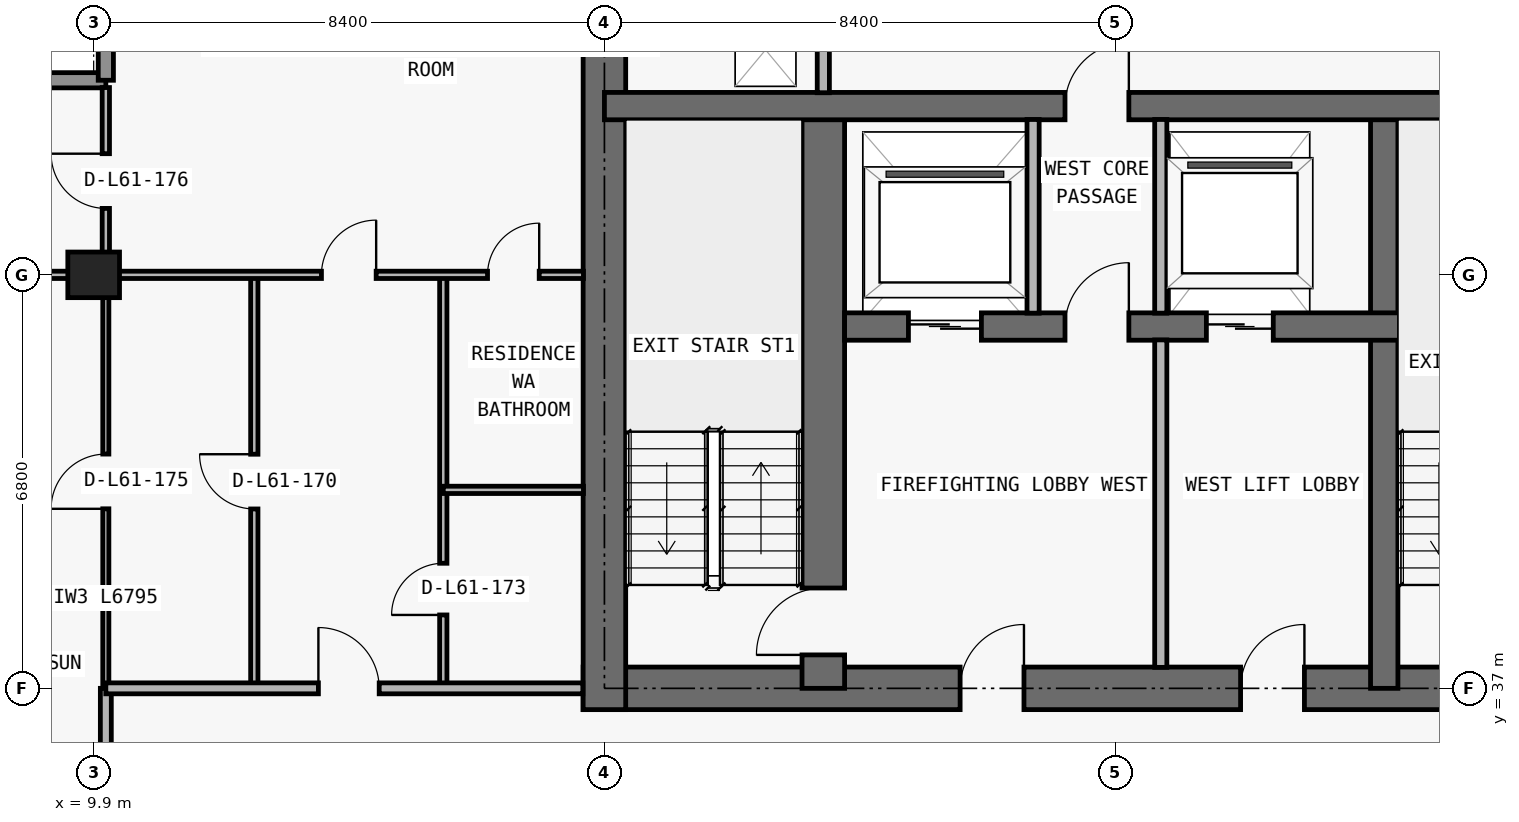
"""IFC4 building model, lengths in metres.
Left out: names, types, materials, properties, quantities, classifications, styles, units other than length and angle.
Written with IfcOpenShell. Run it as: python <this file> out.ifc"""

import sys

from ifc_helpers import new_model, si_unit, direction, frame, frame_2d, origin, origin_2d, place, context, subcontext, project, spatial, rectangle, extrude, element, fill, save


model = new_model("IFC4")
c1 = context("Model", 3, precision=1e-05, world=origin(), true_north=direction((0.0, 1.0)))
c2 = subcontext(c1, "Body", "Model", "MODEL_VIEW")
j1 = project(units=[si_unit("LENGTHUNIT", "METRE"), si_unit("PLANEANGLEUNIT", "RADIAN")], contexts=[c1])
p1 = place(None, origin())
s1 = spatial("IfcSite", under=j1, at=p1, CompositionType="ELEMENT")
p2 = place(p1, origin())
s2 = spatial("IfcBuilding", under=s1, at=p2, CompositionType="ELEMENT")
p3 = place(p2, frame((0.0, 0.0, 218.1)))
s3 = spatial("IfcBuildingStorey", under=s2, at=p3, CompositionType="ELEMENT", Elevation=218.1)
p4 = place(p3, frame((9.9, 43.8, 0.0), z_axis=(0.0, 0.0, 1.0), x_axis=(1.0, 0.0, 0.0)))
e1 = element("IfcColumn", 1, at=p4, inside=s3, PredefinedType="COLUMN", context=c2, shape_type="SweptSolid", body=[
    extrude(rectangle(XDim=0.85, YDim=0.75, at=origin_2d()), origin(), (0.0, 0.0, 1.0), 3.0),
])
p5 = place(p3, frame((17.95, 37.0, 0.0), z_axis=(0.0, 0.0, 1.0), x_axis=(1.0, 0.0, 0.0)))
e2 = element("IfcWall", 2, at=p5, inside=s3, PredefinedType="SHEAR", context=c2, shape_type="SweptSolid", body=[
    extrude(rectangle(XDim=41.9, YDim=0.7, at=frame_2d((20.95, 0.0))), origin(), (0.0, 0.0, 1.0), 3.0),
])
p6 = place(p5, frame((14.35, 0.0, 0.0)))
e3 = element("IfcOpeningElement", 3, at=p6, cuts=e2, PredefinedType="OPENING", context=c2, shape_type="SweptSolid", body=[
    extrude(rectangle(XDim=1.1, YDim=2.15, at=frame_2d((0.55, 1.075))), frame((0.0, 0.36, 0.0), z_axis=(0.0, -1.0, 0.0), x_axis=(1.0, 0.0, 0.0)), (0.0, 0.0, 1.0), 0.72),
])
p7 = place(p5, frame((6.2, 0.0, 0.0)))
e4 = element("IfcOpeningElement", 4, at=p7, cuts=e2, PredefinedType="OPENING", context=c2, shape_type="SweptSolid", body=[
    extrude(rectangle(XDim=1.05, YDim=2.15, at=frame_2d((0.525, 1.075))), frame((0.0, 0.36, 0.0), z_axis=(0.0, -1.0, 0.0), x_axis=(1.0, 0.0, 0.0)), (0.0, 0.0, 1.0), 0.72),
])
p8 = place(p5, frame((34.7, 0.0, 0.0)))
e5 = element("IfcOpeningElement", 5, at=p8, cuts=e2, PredefinedType="OPENING", context=c2, shape_type="SweptSolid", body=[
    extrude(rectangle(XDim=1.05, YDim=2.15, at=frame_2d((0.525, 1.075))), frame((0.0, 0.36, 0.0), z_axis=(0.0, -1.0, 0.0), x_axis=(1.0, 0.0, 0.0)), (0.0, 0.0, 1.0), 0.72),
])
p9 = place(p5, frame((10.812, 0.0, 0.0)))
e6 = element("IfcOpeningElement", 6, at=p9, cuts=e2, PredefinedType="OPENING", context=c2, shape_type="SweptSolid", body=[
    extrude(rectangle(XDim=1.05, YDim=2.15, at=frame_2d((0.525, 1.075))), frame((0.0, 0.36, 0.0), z_axis=(0.0, -1.0, 0.0), x_axis=(1.0, 0.0, 0.0)), (0.0, 0.0, 1.0), 0.72),
])
p10 = place(p5, frame((24.05, 0.0, 0.0)))
e7 = element("IfcOpeningElement", 7, at=p10, cuts=e2, PredefinedType="OPENING", context=c2, shape_type="SweptSolid", body=[
    extrude(rectangle(XDim=1.05, YDim=2.15, at=frame_2d((0.525, 1.075))), frame((0.0, 0.36, 0.0), z_axis=(0.0, -1.0, 0.0), x_axis=(1.0, 0.0, 0.0)), (0.0, 0.0, 1.0), 0.72),
])
p11 = place(p3, frame((18.3, 36.65, 0.0), z_axis=(0.0, 0.0, 1.0), x_axis=(0.0, 1.0, 0.0)))
e8 = element("IfcWall", 8, at=p11, inside=s3, PredefinedType="SHEAR", context=c2, shape_type="SweptSolid", body=[
    extrude(rectangle(XDim=13.95, YDim=0.7, at=frame_2d((6.975, 0.0))), origin(), (0.0, 0.0, 1.0), 3.0),
])
p12 = place(p3, frame((21.9, 37.0, 0.0), z_axis=(0.0, 0.0, 1.0), x_axis=(0.0, 1.0, 0.0)))
e9 = element("IfcWall", 9, at=p12, inside=s3, PredefinedType="SHEAR", context=c2, shape_type="SweptSolid", body=[
    extrude(rectangle(XDim=9.575, YDim=0.7, at=frame_2d((4.788, 0.0))), origin(), (0.0, 0.0, 1.0), 3.0),
])
p13 = place(p12, frame((0.55, 0.0, 0.0)))
e10 = element("IfcOpeningElement", 10, at=p13, cuts=e9, PredefinedType="OPENING", context=c2, shape_type="SweptSolid", body=[
    extrude(rectangle(XDim=1.1, YDim=2.15, at=frame_2d((0.55, 1.075))), frame((0.0, 0.36, 0.0), z_axis=(0.0, -1.0, 0.0), x_axis=(1.0, 0.0, 0.0)), (0.0, 0.0, 1.0), 0.72),
])
p14 = place(p3, frame((31.125, 37.0, 0.0), z_axis=(0.0, 0.0, 1.0), x_axis=(0.0, 1.0, 0.0)))
e11 = element("IfcWall", 11, at=p14, inside=s3, PredefinedType="SHEAR", context=c2, shape_type="SweptSolid", body=[
    extrude(rectangle(XDim=9.575, YDim=0.45, at=frame_2d((4.788, 0.0))), origin(), (0.0, 0.0, 1.0), 3.0),
])
p15 = place(p3, frame((22.25, 42.95, 0.0), z_axis=(0.0, 0.0, 1.0), x_axis=(1.0, 0.0, 0.0)))
e12 = element("IfcWall", 12, at=p15, inside=s3, PredefinedType="SHEAR", context=c2, shape_type="SweptSolid", body=[
    extrude(rectangle(XDim=33.3, YDim=0.45, at=frame_2d((16.65, 0.0))), origin(), (0.0, 0.0, 1.0), 3.0),
])
p16 = place(p15, frame((1.05, 0.0, 0.0)))
e13 = element("IfcOpeningElement", 13, at=p16, cuts=e12, PredefinedType="OPENING", context=c2, shape_type="SweptSolid", body=[
    extrude(rectangle(XDim=1.2, YDim=2.2, at=frame_2d((0.6, 1.1))), frame((0.0, 0.235, 0.0), z_axis=(0.0, -1.0, 0.0), x_axis=(1.0, 0.0, 0.0)), (0.0, 0.0, 1.0), 0.47),
])
p17 = place(p15, frame((31.05, 0.0, 0.0)))
e14 = element("IfcOpeningElement", 14, at=p17, cuts=e12, PredefinedType="OPENING", context=c2, shape_type="SweptSolid", body=[
    extrude(rectangle(XDim=1.2, YDim=2.2, at=frame_2d((0.6, 1.1))), frame((0.0, 0.235, 0.0), z_axis=(0.0, -1.0, 0.0), x_axis=(1.0, 0.0, 0.0)), (0.0, 0.0, 1.0), 0.47),
])
p18 = place(p15, frame((26.45, 0.0, 0.0)))
e15 = element("IfcOpeningElement", 15, at=p18, cuts=e12, PredefinedType="OPENING", context=c2, shape_type="SweptSolid", body=[
    extrude(rectangle(XDim=1.1, YDim=2.2, at=frame_2d((0.55, 1.1))), frame((0.0, 0.235, 0.0), z_axis=(0.0, -1.0, 0.0), x_axis=(1.0, 0.0, 0.0)), (0.0, 0.0, 1.0), 0.47),
])
p19 = place(p15, frame((5.95, 0.0, 0.0)))
e16 = element("IfcOpeningElement", 16, at=p19, cuts=e12, PredefinedType="OPENING", context=c2, shape_type="SweptSolid", body=[
    extrude(rectangle(XDim=1.1, YDim=2.2, at=frame_2d((0.55, 1.1))), frame((0.0, 0.235, 0.0), z_axis=(0.0, -1.0, 0.0), x_axis=(1.0, 0.0, 0.0)), (0.0, 0.0, 1.0), 0.47),
])
p20 = place(p15, frame((3.625, 0.0, 0.0)))
e17 = element("IfcOpeningElement", 17, at=p20, cuts=e12, PredefinedType="OPENING", context=c2, shape_type="SweptSolid", body=[
    extrude(rectangle(XDim=1.05, YDim=2.15, at=frame_2d((0.525, 1.075))), frame((0.0, 0.235, 0.0), z_axis=(0.0, -1.0, 0.0), x_axis=(1.0, 0.0, 0.0)), (0.0, 0.0, 1.0), 0.47),
])
p21 = place(p15, frame((28.675, 0.0, 0.0)))
e18 = element("IfcOpeningElement", 18, at=p21, cuts=e12, PredefinedType="OPENING", context=c2, shape_type="SweptSolid", body=[
    extrude(rectangle(XDim=1.05, YDim=2.15, at=frame_2d((0.525, 1.075))), frame((0.0, 0.235, 0.0), z_axis=(0.0, -1.0, 0.0), x_axis=(1.0, 0.0, 0.0)), (0.0, 0.0, 1.0), 0.47),
])
p22 = place(p15, frame((15.225, 0.0, 0.0)))
e19 = element("IfcOpeningElement", 19, at=p22, cuts=e12, PredefinedType="OPENING", context=c2, shape_type="SweptSolid", body=[
    extrude(rectangle(XDim=1.0, YDim=2.2, at=frame_2d((0.5, 1.1))), frame((0.0, 0.235, 0.0), z_axis=(0.0, -1.0, 0.0), x_axis=(1.0, 0.0, 0.0)), (0.0, 0.0, 1.0), 0.47),
])
p23 = place(p15, frame((21.975, 0.0, 0.0)))
e20 = element("IfcOpeningElement", 20, at=p23, cuts=e12, PredefinedType="OPENING", context=c2, shape_type="SweptSolid", body=[
    extrude(rectangle(XDim=1.0, YDim=2.2, at=frame_2d((0.5, 1.1))), frame((0.0, 0.235, 0.0), z_axis=(0.0, -1.0, 0.0), x_axis=(1.0, 0.0, 0.0)), (0.0, 0.0, 1.0), 0.47),
])
p24 = place(p3, frame((18.3, 46.575, 0.0), z_axis=(0.0, 0.0, 1.0), x_axis=(1.0, 0.0, 0.0)))
e21 = element("IfcWall", 21, at=p24, inside=s3, PredefinedType="SHEAR", context=c2, shape_type="SweptSolid", body=[
    extrude(rectangle(XDim=41.2, YDim=0.45, at=frame_2d((20.6, 0.0))), origin(), (0.0, 0.0, 1.0), 3.0),
])
p25 = place(p24, frame((7.575, 0.0, 0.0)))
e22 = element("IfcOpeningElement", 22, at=p25, cuts=e21, PredefinedType="OPENING", context=c2, shape_type="SweptSolid", body=[
    extrude(rectangle(XDim=1.05, YDim=2.15, at=frame_2d((0.525, 1.075))), frame((0.0, 0.235, 0.0), z_axis=(0.0, -1.0, 0.0), x_axis=(1.0, 0.0, 0.0)), (0.0, 0.0, 1.0), 0.47),
])
p26 = place(p24, frame((32.625, 0.0, 0.0)))
e23 = element("IfcOpeningElement", 23, at=p26, cuts=e21, PredefinedType="OPENING", context=c2, shape_type="SweptSolid", body=[
    extrude(rectangle(XDim=1.05, YDim=2.15, at=frame_2d((0.525, 1.075))), frame((0.0, 0.235, 0.0), z_axis=(0.0, -1.0, 0.0), x_axis=(1.0, 0.0, 0.0)), (0.0, 0.0, 1.0), 0.47),
])
p27 = place(p3, frame((6.25, 47.0, 0.0), z_axis=(0.0, 0.0, 1.0), x_axis=(1.0, 0.0, 0.0)))
e24 = element("IfcWall", 24, at=p27, inside=s3, PredefinedType="ELEMENTEDWALL", context=c2, shape_type="SweptSolid", body=[
    extrude(rectangle(XDim=3.85, YDim=0.25, at=frame_2d((1.925, 0.0))), origin(), (0.0, 0.0, 1.0), 3.0),
])
p28 = place(p3, frame((10.1, 47.0, 0.0), z_axis=(0.0, 0.0, 1.0), x_axis=(0.0, 1.0, 0.0)))
e25 = element("IfcWall", 25, at=p28, inside=s3, PredefinedType="ELEMENTEDWALL", context=c2, shape_type="SweptSolid", body=[
    extrude(rectangle(XDim=3.45, YDim=0.25, at=frame_2d((1.725, 0.0))), origin(), (0.0, 0.0, 1.0), 3.0),
])
p29 = place(p3, frame((10.1, 34.405, 0.0), z_axis=(0.0, 0.0, 1.0), x_axis=(0.0, 1.0, 0.0)))
e26 = element("IfcWall", 26, at=p29, inside=s3, PredefinedType="PARTITIONING", context=c2, shape_type="SweptSolid", body=[
    extrude(rectangle(XDim=2.595, YDim=0.18, at=frame_2d((1.297, 0.0))), origin(), (0.0, 0.0, 1.0), 2.213),
])
p30 = place(p3, frame((10.1, 37.005, 0.0), z_axis=(0.0, 0.0, 1.0), x_axis=(0.0, 1.0, 0.0)))
e27 = element("IfcWall", 27, at=p30, inside=s3, PredefinedType="MOVABLE", context=c2, shape_type="SweptSolid", body=[
    extrude(rectangle(XDim=6.795, YDim=0.1, at=frame_2d((3.397, 0.0))), origin(), (0.0, 0.0, 1.0), 2.213),
])
p31 = place(p30, frame((2.948, 0.0, 0.0)))
e28 = element("IfcOpeningElement", 28, at=p31, cuts=e27, PredefinedType="OPENING", context=c2, shape_type="SweptSolid", body=[
    extrude(rectangle(XDim=0.9, YDim=2.15, at=frame_2d((0.45, 1.075))), frame((0.0, 0.06, 0.0), z_axis=(0.0, -1.0, 0.0), x_axis=(1.0, 0.0, 0.0)), (0.0, 0.0, 1.0), 0.12),
])
p32 = place(p3, frame((10.1, 43.805, 0.0), z_axis=(0.0, 0.0, 1.0), x_axis=(0.0, 1.0, 0.0)))
e29 = element("IfcWall", 29, at=p32, inside=s3, PredefinedType="PARTITIONING", context=c2, shape_type="SweptSolid", body=[
    extrude(rectangle(XDim=3.075, YDim=0.12, at=frame_2d((1.538, 0.0))), origin(), (0.0, 0.0, 1.0), 3.0),
])
p33 = place(p32, frame((1.087, 0.0, 0.0)))
e30 = element("IfcOpeningElement", 30, at=p33, cuts=e29, PredefinedType="OPENING", context=c2, shape_type="SweptSolid", body=[
    extrude(rectangle(XDim=0.9, YDim=2.15, at=frame_2d((0.45, 1.075))), frame((0.0, 0.07, 0.0), z_axis=(0.0, -1.0, 0.0), x_axis=(1.0, 0.0, 0.0)), (0.0, 0.0, 1.0), 0.14),
])
p34 = place(p3, frame((12.542, 37.0, 0.0), z_axis=(0.0, 0.0, 1.0), x_axis=(0.0, 1.0, 0.0)))
e31 = element("IfcWall", 31, at=p34, inside=s3, PredefinedType="PARTITIONING", context=c2, shape_type="SweptSolid", body=[
    extrude(rectangle(XDim=6.8, YDim=0.12, at=frame_2d((3.4, 0.0))), origin(), (0.0, 0.0, 1.0), 3.0),
])
p35 = place(p34, frame((2.95, 0.0, 0.0)))
e32 = element("IfcOpeningElement", 32, at=p35, cuts=e31, PredefinedType="OPENING", context=c2, shape_type="SweptSolid", body=[
    extrude(rectangle(XDim=0.9, YDim=2.15, at=frame_2d((0.45, 1.075))), frame((0.0, 0.07, 0.0), z_axis=(0.0, -1.0, 0.0), x_axis=(1.0, 0.0, 0.0)), (0.0, 0.0, 1.0), 0.14),
])
p36 = place(p3, frame((15.65, 37.0, 0.0), z_axis=(0.0, 0.0, 1.0), x_axis=(0.0, 1.0, 0.0)))
e33 = element("IfcWall", 33, at=p36, inside=s3, PredefinedType="PARTITIONING", context=c2, shape_type="SweptSolid", body=[
    extrude(rectangle(XDim=6.8, YDim=0.12, at=frame_2d((3.4, 0.0))), origin(), (0.0, 0.0, 1.0), 3.0),
])
p37 = place(p36, frame((1.207, 0.0, 0.0)))
e34 = element("IfcOpeningElement", 34, at=p37, cuts=e33, PredefinedType="OPENING", context=c2, shape_type="SweptSolid", body=[
    extrude(rectangle(XDim=0.85, YDim=2.1, at=frame_2d((0.425, 1.05))), frame((0.0, 0.07, 0.0), z_axis=(0.0, -1.0, 0.0), x_axis=(1.0, 0.0, 0.0)), (0.0, 0.0, 1.0), 0.14),
])
p38 = place(p3, frame((21.9, 46.795, 0.0), z_axis=(0.0, 0.0, 1.0), x_axis=(0.0, 1.0, 0.0)))
e35 = element("IfcWall", 35, at=p38, inside=s3, PredefinedType="PARTITIONING", context=c2, shape_type="SweptSolid", body=[
    extrude(rectangle(XDim=3.16, YDim=0.2, at=frame_2d((1.58, 0.0))), origin(), (0.0, 0.0, 1.0), 3.0),
])
p39 = place(p3, frame((25.35, 43.17, 0.0), z_axis=(0.0, 0.0, 1.0), x_axis=(0.0, 1.0, 0.0)))
e36 = element("IfcWall", 36, at=p39, inside=s3, PredefinedType="PARTITIONING", context=c2, shape_type="SweptSolid", body=[
    extrude(rectangle(XDim=3.185, YDim=0.2, at=frame_2d((1.593, 0.0))), origin(), (0.0, 0.0, 1.0), 3.0),
])
p40 = place(p3, frame((27.45, 37.345, 0.0), z_axis=(0.0, 0.0, 1.0), x_axis=(0.0, 1.0, 0.0)))
e37 = element("IfcWall", 37, at=p40, inside=s3, PredefinedType="PARTITIONING", context=c2, shape_type="SweptSolid", body=[
    extrude(rectangle(XDim=5.385, YDim=0.2, at=frame_2d((2.692, 0.0))), origin(), (0.0, 0.0, 1.0), 3.0),
])
p41 = place(p3, frame((27.45, 43.17, 0.0), z_axis=(0.0, 0.0, 1.0), x_axis=(0.0, 1.0, 0.0)))
e38 = element("IfcWall", 38, at=p41, inside=s3, PredefinedType="PARTITIONING", context=c2, shape_type="SweptSolid", body=[
    extrude(rectangle(XDim=3.185, YDim=0.2, at=frame_2d((1.593, 0.0))), origin(), (0.0, 0.0, 1.0), 3.0),
])
p42 = place(p3, frame((10.1, 37.0, 0.0), z_axis=(0.0, 0.0, 1.0), x_axis=(1.0, 0.0, 0.0)))
e39 = element("IfcWall", 39, at=p42, inside=s3, PredefinedType="PARTITIONING", context=c2, shape_type="SweptSolid", body=[
    extrude(rectangle(XDim=7.845, YDim=0.18, at=frame_2d((3.922, 0.0))), origin(), (0.0, 0.0, 1.0), 3.0),
])
p43 = place(p42, frame((3.496, 0.0, 0.0)))
e40 = element("IfcOpeningElement", 40, at=p43, cuts=e39, PredefinedType="OPENING", context=c2, shape_type="SweptSolid", body=[
    extrude(rectangle(XDim=1.0, YDim=2.2, at=frame_2d((0.5, 1.1))), frame((0.0, 0.1, 0.0), z_axis=(0.0, -1.0, 0.0), x_axis=(1.0, 0.0, 0.0)), (0.0, 0.0, 1.0), 0.2),
])
p44 = place(p3, frame((15.65, 40.264, 0.0), z_axis=(0.0, 0.0, 1.0), x_axis=(1.0, 0.0, 0.0)))
e41 = element("IfcWall", 41, at=p44, inside=s3, PredefinedType="PARTITIONING", context=c2, shape_type="SweptSolid", body=[
    extrude(rectangle(XDim=2.305, YDim=0.12, at=frame_2d((1.153, 0.0))), origin(), (0.0, 0.0, 1.0), 3.0),
])
p45 = place(p3, frame((6.395, 43.8, 0.0), z_axis=(0.0, 0.0, 1.0), x_axis=(1.0, 0.0, 0.0)))
e42 = element("IfcWall", 42, at=p45, inside=s3, PredefinedType="PARTITIONING", context=c2, shape_type="SweptSolid", body=[
    extrude(rectangle(XDim=11.56, YDim=0.12, at=frame_2d((5.78, 0.0))), origin(), (0.0, 0.0, 1.0), 2.368),
])
p46 = place(p45, frame((7.251, 0.0, 0.0)))
e43 = element("IfcOpeningElement", 43, at=p46, cuts=e42, PredefinedType="OPENING", context=c2, shape_type="SweptSolid", body=[
    extrude(rectangle(XDim=0.9, YDim=2.15, at=frame_2d((0.45, 1.075))), frame((0.0, 0.07, 0.0), z_axis=(0.0, -1.0, 0.0), x_axis=(1.0, 0.0, 0.0)), (0.0, 0.0, 1.0), 0.14),
])
p47 = place(p45, frame((9.982, 0.0, 0.0)))
e44 = element("IfcOpeningElement", 44, at=p47, cuts=e42, PredefinedType="OPENING", context=c2, shape_type="SweptSolid", body=[
    extrude(rectangle(XDim=0.85, YDim=2.1, at=frame_2d((0.425, 1.05))), frame((0.0, 0.07, 0.0), z_axis=(0.0, -1.0, 0.0), x_axis=(1.0, 0.0, 0.0)), (0.0, 0.0, 1.0), 0.14),
])
p48 = place(p16, origin())
e45 = element("IfcDoor", 45, at=p48, inside=s3, OperationType="DOUBLE_DOOR_SLIDING", PredefinedType="DOOR", context=c2, shape_type="SweptSolid", body=[
    extrude(rectangle(XDim=1.2, YDim=2.2, at=frame_2d((0.6, 1.1))), frame((0.0, 0.025, 0.0), z_axis=(0.0, -1.0, 0.0), x_axis=(1.0, 0.0, 0.0)), (0.0, 0.0, 1.0), 0.05),
])
fill(e13, e45)
p49 = place(p19, origin())
e46 = element("IfcDoor", 46, at=p49, inside=s3, OperationType="DOUBLE_DOOR_SLIDING", PredefinedType="DOOR", context=c2, shape_type="SweptSolid", body=[
    extrude(rectangle(XDim=1.1, YDim=2.2, at=frame_2d((0.55, 1.1))), frame((0.0, 0.025, 0.0), z_axis=(0.0, -1.0, 0.0), x_axis=(1.0, 0.0, 0.0)), (0.0, 0.0, 1.0), 0.05),
])
fill(e16, e46)
p50 = place(p7, origin())
e47 = element("IfcDoor", 47, at=p50, inside=s3, OperationType="SINGLE_SWING_RIGHT", PredefinedType="DOOR", context=c2, shape_type="SweptSolid", body=[
    extrude(rectangle(XDim=1.05, YDim=2.15, at=frame_2d((0.525, 1.075))), frame((0.0, 0.025, 0.0), z_axis=(0.0, -1.0, 0.0), x_axis=(1.0, 0.0, 0.0)), (0.0, 0.0, 1.0), 0.05),
])
fill(e4, e47)
p51 = place(p13, origin())
e48 = element("IfcDoor", 48, at=p51, inside=s3, OperationType="SINGLE_SWING_LEFT", PredefinedType="DOOR", context=c2, shape_type="SweptSolid", body=[
    extrude(rectangle(XDim=1.1, YDim=2.15, at=frame_2d((0.55, 1.075))), frame((0.0, 0.025, 0.0), z_axis=(0.0, -1.0, 0.0), x_axis=(1.0, 0.0, 0.0)), (0.0, 0.0, 1.0), 0.05),
])
fill(e10, e48)
p52 = place(p20, origin())
e49 = element("IfcDoor", 49, at=p52, inside=s3, OperationType="SINGLE_SWING_RIGHT", PredefinedType="DOOR", context=c2, shape_type="SweptSolid", body=[
    extrude(rectangle(XDim=1.05, YDim=2.15, at=frame_2d((0.525, 1.075))), frame((0.0, 0.025, 0.0), z_axis=(0.0, -1.0, 0.0), x_axis=(1.0, 0.0, 0.0)), (0.0, 0.0, 1.0), 0.05),
])
fill(e17, e49)
p53 = place(p9, origin())
e50 = element("IfcDoor", 50, at=p53, inside=s3, OperationType="SINGLE_SWING_RIGHT", PredefinedType="DOOR", context=c2, shape_type="SweptSolid", body=[
    extrude(rectangle(XDim=1.05, YDim=2.15, at=frame_2d((0.525, 1.075))), frame((0.0, 0.025, 0.0), z_axis=(0.0, -1.0, 0.0), x_axis=(1.0, 0.0, 0.0)), (0.0, 0.0, 1.0), 0.05),
])
fill(e6, e50)
p54 = place(p25, origin())
e51 = element("IfcDoor", 51, at=p54, inside=s3, OperationType="SINGLE_SWING_RIGHT", PredefinedType="DOOR", context=c2, shape_type="SweptSolid", body=[
    extrude(rectangle(XDim=1.05, YDim=2.15, at=frame_2d((0.525, 1.075))), frame((0.0, 0.025, 0.0), z_axis=(0.0, -1.0, 0.0), x_axis=(1.0, 0.0, 0.0)), (0.0, 0.0, 1.0), 0.05),
])
fill(e22, e51)
p55 = place(p35, origin())
e52 = element("IfcDoor", 52, at=p55, inside=s3, OperationType="SINGLE_SWING_RIGHT", PredefinedType="DOOR", context=c2, shape_type="SweptSolid", body=[
    extrude(rectangle(XDim=0.9, YDim=2.15, at=frame_2d((0.45, 1.075))), frame((0.0, 0.025, 0.0), z_axis=(0.0, -1.0, 0.0), x_axis=(1.0, 0.0, 0.0)), (0.0, 0.0, 1.0), 0.05),
])
fill(e32, e52)
p56 = place(p43, origin())
e53 = element("IfcDoor", 53, at=p56, inside=s3, OperationType="SINGLE_SWING_LEFT", PredefinedType="DOOR", context=c2, shape_type="SweptSolid", body=[
    extrude(rectangle(XDim=1.0, YDim=2.2, at=frame_2d((0.5, 1.1))), frame((0.0, 0.025, 0.0), z_axis=(0.0, -1.0, 0.0), x_axis=(1.0, 0.0, 0.0)), (0.0, 0.0, 1.0), 0.05),
])
fill(e40, e53)
p57 = place(p46, origin())
e54 = element("IfcDoor", 54, at=p57, inside=s3, OperationType="SINGLE_SWING_RIGHT", PredefinedType="DOOR", context=c2, shape_type="SweptSolid", body=[
    extrude(rectangle(XDim=0.9, YDim=2.15, at=frame_2d((0.45, 1.075))), frame((0.0, 0.025, 0.0), z_axis=(0.0, -1.0, 0.0), x_axis=(1.0, 0.0, 0.0)), (0.0, 0.0, 1.0), 0.05),
])
fill(e43, e54)
p58 = place(p37, origin())
e55 = element("IfcDoor", 55, at=p58, inside=s3, OperationType="SINGLE_SWING_LEFT", PredefinedType="DOOR", context=c2, shape_type="SweptSolid", body=[
    extrude(rectangle(XDim=0.85, YDim=2.1, at=frame_2d((0.425, 1.05))), frame((0.0, 0.025, 0.0), z_axis=(0.0, -1.0, 0.0), x_axis=(1.0, 0.0, 0.0)), (0.0, 0.0, 1.0), 0.05),
])
fill(e34, e55)
p59 = place(p47, origin())
e56 = element("IfcDoor", 56, at=p59, inside=s3, OperationType="SINGLE_SWING_RIGHT", PredefinedType="DOOR", context=c2, shape_type="SweptSolid", body=[
    extrude(rectangle(XDim=0.85, YDim=2.1, at=frame_2d((0.425, 1.05))), frame((0.0, 0.025, 0.0), z_axis=(0.0, -1.0, 0.0), x_axis=(1.0, 0.0, 0.0)), (0.0, 0.0, 1.0), 0.05),
])
fill(e44, e56)
p60 = place(p31, origin())
e57 = element("IfcDoor", 57, at=p60, inside=s3, OperationType="SINGLE_SWING_LEFT", PredefinedType="DOOR", context=c2, shape_type="SweptSolid", body=[
    extrude(rectangle(XDim=0.9, YDim=2.15, at=frame_2d((0.45, 1.075))), frame((0.0, 0.025, 0.0), z_axis=(0.0, -1.0, 0.0), x_axis=(1.0, 0.0, 0.0)), (0.0, 0.0, 1.0), 0.05),
])
fill(e28, e57)
p61 = place(p33, origin())
e58 = element("IfcDoor", 58, at=p61, inside=s3, OperationType="SINGLE_SWING_RIGHT", PredefinedType="DOOR", context=c2, shape_type="SweptSolid", body=[
    extrude(rectangle(XDim=0.9, YDim=2.15, at=frame_2d((0.45, 1.075))), frame((0.0, 0.025, 0.0), z_axis=(0.0, -1.0, 0.0), x_axis=(1.0, 0.0, 0.0)), (0.0, 0.0, 1.0), 0.05),
])
fill(e30, e58)
save(model, sys.argv[1])
